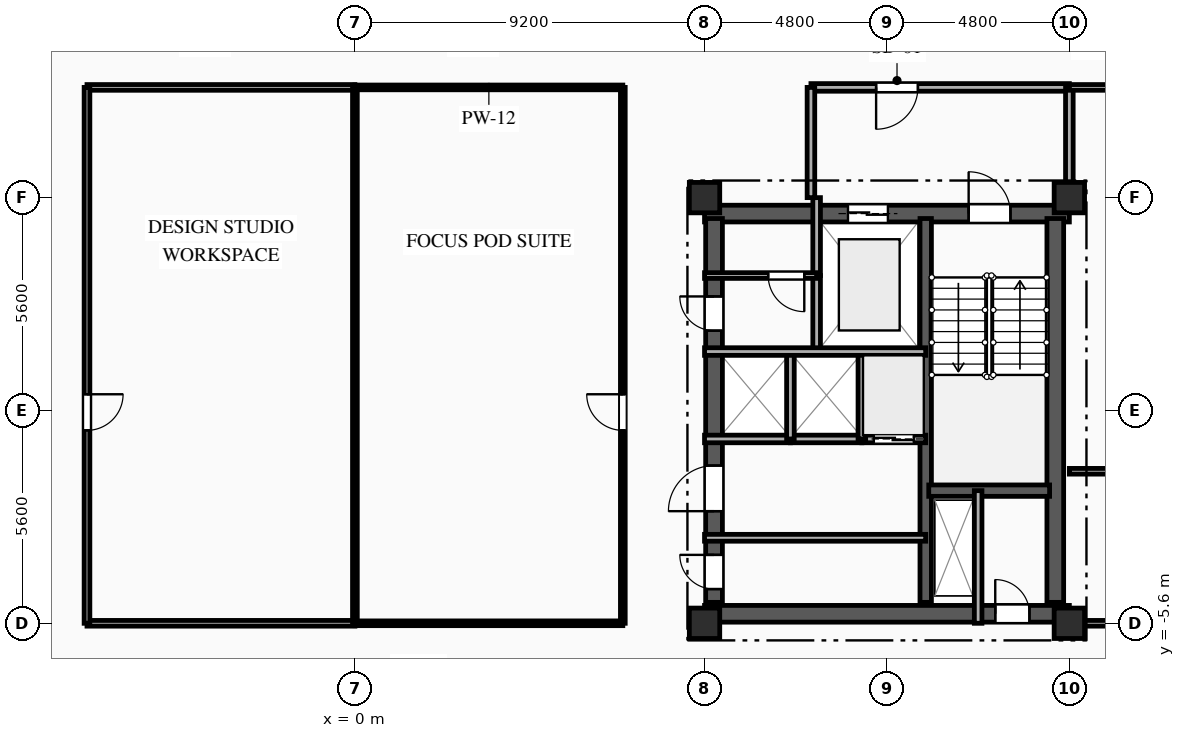
"""IFC4 building model, lengths in metres.
Left out: names, types, materials, properties, quantities, classifications, styles, units other than length and angle.
Written with IfcOpenShell. Run it as: python <this file> out.ifc"""

import sys

from ifc_helpers import new_model, si_unit, direction, frame, frame_2d, origin, origin_2d, place, context, subcontext, project, spatial, rectangle, extrude, element, fill, save


model = new_model("IFC4")
c1 = context("Model", 3, precision=1e-05, world=origin(), true_north=direction((0.0, 1.0)))
c2 = subcontext(c1, "Body", "Model", "MODEL_VIEW")
j1 = project(units=[si_unit("LENGTHUNIT", "METRE"), si_unit("PLANEANGLEUNIT", "RADIAN")], contexts=[c1])
p1 = place(None, origin())
s1 = spatial("IfcSite", under=j1, at=p1, CompositionType="ELEMENT")
p2 = place(p1, origin())
s2 = spatial("IfcBuilding", under=s1, at=p2, CompositionType="ELEMENT")
p3 = place(p2, frame((0.0, 0.0, 235.0)))
s3 = spatial("IfcBuildingStorey", under=s2, at=p3, CompositionType="ELEMENT", Elevation=235.0)
for number, where, z_axis, x_axis in (
    (1, (9.2, -5.6, 0.0), (0.0, 0.0, 1.0), (1.0, 0.0, 0.0)),
    (2, (9.2, 5.6, 0.0), (0.0, 0.0, 1.0), (1.0, 0.0, 0.0)),
    (3, (18.8, -5.6, 0.0), (0.0, 0.0, 1.0), (1.0, 0.0, 0.0)),
    (4, (18.8, 5.6, 0.0), (0.0, 0.0, 1.0), (1.0, 0.0, 0.0)),
):
    element("IfcColumn", number, at=place(p3, frame(where, z_axis=z_axis, x_axis=x_axis)), inside=s3, PredefinedType="COLUMN", context=c2, shape_type="SweptSolid", body=[
        extrude(rectangle(XDim=0.8, YDim=0.8, at=origin_2d()), origin(), (0.0, 0.0, 1.0), 3.35),
    ])
p4 = place(p3, frame((9.2, 5.18, 0.0), z_axis=(0.0, 0.0, 1.0), x_axis=(1.0, 0.0, 0.0)))
e5 = element("IfcWall", 5, at=p4, inside=s3, PredefinedType="SHEAR", context=c2, shape_type="SweptSolid", body=[
    extrude(rectangle(XDim=9.6, YDim=0.44, at=frame_2d((4.8, 0.0))), origin(), (0.0, 0.0, 1.0), 3.04),
])
p5 = place(p4, frame((6.95, 0.0, 0.0)))
e6 = element("IfcOpeningElement", 6, at=p5, cuts=e5, PredefinedType="OPENING", context=c2, shape_type="SweptSolid", body=[
    extrude(rectangle(XDim=1.1, YDim=2.15, at=frame_2d((0.55, 1.075))), frame((0.0, 0.23, 0.0), z_axis=(0.0, -1.0, 0.0), x_axis=(1.0, 0.0, 0.0)), (0.0, 0.0, 1.0), 0.46),
])
p6 = place(p4, frame((3.775, 0.0, 0.0)))
e7 = element("IfcOpeningElement", 7, at=p6, cuts=e5, PredefinedType="OPENING", context=c2, shape_type="SweptSolid", body=[
    extrude(rectangle(XDim=1.05, YDim=2.1, at=frame_2d((0.525, 1.05))), frame((0.0, 0.23, 0.0), z_axis=(0.0, -1.0, 0.0), x_axis=(1.0, 0.0, 0.0)), (0.0, 0.0, 1.0), 0.46),
])
p7 = place(p3, frame((9.2, -5.35, 0.0), z_axis=(0.0, 0.0, 1.0), x_axis=(1.0, 0.0, 0.0)))
e8 = element("IfcWall", 8, at=p7, inside=s3, PredefinedType="SHEAR", context=c2, shape_type="SweptSolid", body=[
    extrude(rectangle(XDim=9.6, YDim=0.44, at=frame_2d((4.8, 0.0))), origin(), (0.0, 0.0, 1.0), 3.04),
])
p8 = place(p7, frame((7.65, 0.0, 0.0)))
e9 = element("IfcOpeningElement", 9, at=p8, cuts=e8, PredefinedType="OPENING", context=c2, shape_type="SweptSolid", body=[
    extrude(rectangle(XDim=0.9, YDim=2.1, at=frame_2d((0.45, 1.05))), frame((0.0, 0.23, 0.0), z_axis=(0.0, -1.0, 0.0), x_axis=(1.0, 0.0, 0.0)), (0.0, 0.0, 1.0), 0.46),
])
p9 = place(p3, frame((9.45, -5.05, 0.0), z_axis=(0.0, 0.0, 1.0), x_axis=(0.0, 1.0, 0.0)))
e10 = element("IfcWall", 10, at=p9, inside=s3, PredefinedType="SHEAR", context=c2, shape_type="SweptSolid", body=[
    extrude(rectangle(XDim=10.1, YDim=0.44, at=frame_2d((5.05, 0.0))), origin(), (0.0, 0.0, 1.0), 3.04),
])
p10 = place(p9, frame((7.15, 0.0, 0.0)))
e11 = element("IfcOpeningElement", 11, at=p10, cuts=e10, PredefinedType="OPENING", context=c2, shape_type="SweptSolid", body=[
    extrude(rectangle(XDim=0.9, YDim=2.1, at=frame_2d((0.45, 1.05))), frame((0.0, 0.23, 0.0), z_axis=(0.0, -1.0, 0.0), x_axis=(1.0, 0.0, 0.0)), (0.0, 0.0, 1.0), 0.46),
])
p11 = place(p9, frame((2.4, 0.0, 0.0)))
e12 = element("IfcOpeningElement", 12, at=p11, cuts=e10, PredefinedType="OPENING", context=c2, shape_type="SweptSolid", body=[
    extrude(rectangle(XDim=1.2, YDim=2.15, at=frame_2d((0.6, 1.075))), frame((0.0, 0.23, 0.0), z_axis=(0.0, -1.0, 0.0), x_axis=(1.0, 0.0, 0.0)), (0.0, 0.0, 1.0), 0.46),
])
p12 = place(p9, frame((0.35, 0.0, 0.0)))
e13 = element("IfcOpeningElement", 13, at=p12, cuts=e10, PredefinedType="OPENING", context=c2, shape_type="SweptSolid", body=[
    extrude(rectangle(XDim=0.9, YDim=2.1, at=frame_2d((0.45, 1.05))), frame((0.0, 0.23, 0.0), z_axis=(0.0, -1.0, 0.0), x_axis=(1.0, 0.0, 0.0)), (0.0, 0.0, 1.0), 0.46),
])
p13 = place(p3, frame((18.43, -5.05, 0.0), z_axis=(0.0, 0.0, 1.0), x_axis=(0.0, 1.0, 0.0)))
e14 = element("IfcWall", 14, at=p13, inside=s3, PredefinedType="SHEAR", context=c2, shape_type="SweptSolid", body=[
    extrude(rectangle(XDim=10.1, YDim=0.44, at=frame_2d((5.05, 0.0))), origin(), (0.0, 0.0, 1.0), 3.04),
])
p14 = place(p3, frame((15.02, -5.05, 0.0), z_axis=(0.0, 0.0, 1.0), x_axis=(0.0, 1.0, 0.0)))
e15 = element("IfcWall", 15, at=p14, inside=s3, PredefinedType="SHEAR", context=c2, shape_type="SweptSolid", body=[
    extrude(rectangle(XDim=10.1, YDim=0.3, at=frame_2d((5.05, 0.0))), origin(), (0.0, 0.0, 1.0), 3.04),
])
p15 = place(p3, frame((15.1, -2.11, 0.0), z_axis=(0.0, 0.0, 1.0), x_axis=(1.0, 0.0, 0.0)))
e16 = element("IfcWall", 16, at=p15, inside=s3, PredefinedType="SHEAR", context=c2, shape_type="SweptSolid", body=[
    extrude(rectangle(XDim=3.18, YDim=0.3, at=frame_2d((1.59, 0.0))), origin(), (0.0, 0.0, 1.0), 3.04),
])
p16 = place(p3, frame((16.4, -2.11, 0.0), z_axis=(0.0, 0.0, 1.0), x_axis=(0.0, -1.0, 0.0)))
e17 = element("IfcWall", 17, at=p16, inside=s3, PredefinedType="PARTITIONING", context=c2, shape_type="SweptSolid", body=[
    extrude(rectangle(XDim=3.49, YDim=0.2, at=frame_2d((1.745, 0.0))), origin(), (0.0, 0.0, 1.0), 3.04),
])
p17 = place(p3, frame((12.15, 3.55, 0.0), z_axis=(0.0, 0.0, 1.0), x_axis=(0.0, -1.0, 0.0)))
e18 = element("IfcWall", 18, at=p17, inside=s3, PredefinedType="PARTITIONING", context=c2, shape_type="SweptSolid", body=[
    extrude(rectangle(XDim=2.0, YDim=0.2, at=frame_2d((1.0, 0.0))), origin(), (0.0, 0.0, 1.0), 3.04),
])
p18 = place(p3, frame((12.15, 5.6, 0.0), z_axis=(0.0, 0.0, 1.0), x_axis=(0.0, -1.0, 0.0)))
e19 = element("IfcWall", 19, at=p18, inside=s3, PredefinedType="PARTITIONING", context=c2, shape_type="SweptSolid", body=[
    extrude(rectangle(XDim=2.05, YDim=0.2, at=frame_2d((1.025, 0.0))), origin(), (0.0, 0.0, 1.0), 3.04),
])
p19 = place(p3, frame((18.8, 8.5, 0.0), z_axis=(0.0, 0.0, 1.0), x_axis=(-1.0, 0.0, 0.0)))
e20 = element("IfcWall", 20, at=p19, inside=s3, PredefinedType="PARTITIONING", context=c2, shape_type="SweptSolid", body=[
    extrude(rectangle(XDim=6.8, YDim=0.2, at=frame_2d((3.4, 0.0))), origin(), (0.0, 0.0, 1.0), 3.04),
])
p20 = place(p19, frame((3.985, 0.0, 0.0)))
e21 = element("IfcOpeningElement", 21, at=p20, cuts=e20, PredefinedType="OPENING", context=c2, shape_type="SweptSolid", body=[
    extrude(rectangle(XDim=1.1, YDim=2.15, at=frame_2d((0.55, 1.075))), frame((0.0, 0.11, 0.0), z_axis=(0.0, -1.0, 0.0), x_axis=(1.0, 0.0, 0.0)), (0.0, 0.0, 1.0), 0.22),
])
p21 = place(p3, frame((12.0, 8.5, 0.0), z_axis=(0.0, 0.0, 1.0), x_axis=(0.0, -1.0, 0.0)))
e22 = element("IfcWall", 22, at=p21, inside=s3, PredefinedType="PARTITIONING", context=c2, shape_type="SweptSolid", body=[
    extrude(rectangle(XDim=2.9, YDim=0.2, at=frame_2d((1.45, 0.0))), origin(), (0.0, 0.0, 1.0), 3.04),
])
p22 = place(p3, frame((18.8, 5.6, 0.0), z_axis=(0.0, 0.0, 1.0), x_axis=(0.0, 1.0, 0.0)))
e23 = element("IfcWall", 23, at=p22, inside=s3, PredefinedType="PARTITIONING", context=c2, shape_type="SweptSolid", body=[
    extrude(rectangle(XDim=2.9, YDim=0.2, at=frame_2d((1.45, 0.0))), origin(), (0.0, 0.0, 1.0), 2.665),
])
p23 = place(p3, frame((12.15, 3.55, 0.0), z_axis=(0.0, 0.0, 1.0), x_axis=(-1.0, 0.0, 0.0)))
e24 = element("IfcWall", 24, at=p23, inside=s3, PredefinedType="PARTITIONING", context=c2, shape_type="SweptSolid", body=[
    extrude(rectangle(XDim=2.95, YDim=0.15, at=frame_2d((1.475, 0.0))), origin(), (0.0, 0.0, 1.0), 3.04),
])
p24 = place(p23, frame((0.325, 0.0, 0.0)))
e25 = element("IfcOpeningElement", 25, at=p24, cuts=e24, PredefinedType="OPENING", context=c2, shape_type="SweptSolid", body=[
    extrude(rectangle(XDim=0.95, YDim=2.1, at=frame_2d((0.475, 1.05))), frame((0.0, 0.085, 0.0), z_axis=(0.0, -1.0, 0.0), x_axis=(1.0, 0.0, 0.0)), (0.0, 0.0, 1.0), 0.17),
])
p25 = place(p3, frame((9.2, -3.35, 0.0), z_axis=(0.0, 0.0, 1.0), x_axis=(1.0, 0.0, 0.0)))
e26 = element("IfcWall", 26, at=p25, inside=s3, PredefinedType="PARTITIONING", context=c2, shape_type="SweptSolid", body=[
    extrude(rectangle(XDim=5.82, YDim=0.18, at=frame_2d((2.91, 0.0))), origin(), (0.0, 0.0, 1.0), 2.755),
])
p26 = place(p3, frame((11.46, -0.75, 0.0), z_axis=(0.0, 0.0, 1.0), x_axis=(-1.0, 0.0, 0.0)))
e27 = element("IfcWall", 27, at=p26, inside=s3, PredefinedType="PARTITIONING", context=c2, shape_type="SweptSolid", body=[
    extrude(rectangle(XDim=2.26, YDim=0.2, at=frame_2d((1.13, 0.0))), origin(), (0.0, 0.0, 1.0), 3.04),
])
p27 = place(p3, frame((13.34, -0.75, 0.0), z_axis=(0.0, 0.0, 1.0), x_axis=(-1.0, 0.0, 0.0)))
e28 = element("IfcWall", 28, at=p27, inside=s3, PredefinedType="PARTITIONING", context=c2, shape_type="SweptSolid", body=[
    extrude(rectangle(XDim=1.88, YDim=0.2, at=frame_2d((0.94, 0.0))), origin(), (0.0, 0.0, 1.0), 3.04),
])
p28 = place(p3, frame((15.02, -0.75, 0.0), z_axis=(0.0, 0.0, 1.0), x_axis=(-1.0, 0.0, 0.0)))
e29 = element("IfcWall", 29, at=p28, inside=s3, PredefinedType="PARTITIONING", context=c2, shape_type="SweptSolid", body=[
    extrude(rectangle(XDim=1.68, YDim=0.2, at=frame_2d((0.84, 0.0))), origin(), (0.0, 0.0, 1.0), 3.04),
])
p29 = place(p28, frame((0.315, 0.0, 0.0)))
e30 = element("IfcOpeningElement", 30, at=p29, cuts=e29, PredefinedType="OPENING", context=c2, shape_type="SweptSolid", body=[
    extrude(rectangle(XDim=1.05, YDim=2.1, at=frame_2d((0.525, 1.05))), frame((0.0, 0.11, 0.0), z_axis=(0.0, -1.0, 0.0), x_axis=(1.0, 0.0, 0.0)), (0.0, 0.0, 1.0), 0.22),
])
for number, where, z_axis, x_axis in (
    (31, (11.46, -0.75, 0.0), (0.0, 0.0, 1.0), (0.0, 1.0, 0.0)),
    (32, (13.34, -0.75, 0.0), (0.0, 0.0, 1.0), (0.0, 1.0, 0.0)),
):
    element("IfcWall", number, at=place(p3, frame(where, z_axis=z_axis, x_axis=x_axis)), inside=s3, PredefinedType="PARTITIONING", context=c2, shape_type="SweptSolid", body=[
        extrude(rectangle(XDim=2.3, YDim=0.2, at=frame_2d((1.15, 0.0))), origin(), (0.0, 0.0, 1.0), 3.04),
    ])
p30 = place(p3, frame((0.0, 8.5, 0.0), z_axis=(0.0, 0.0, 1.0), x_axis=(-1.0, 0.0, 0.0)))
e33 = element("IfcWall", 33, at=p30, inside=s3, PredefinedType="PARTITIONING", context=c2, shape_type="SweptSolid", body=[
    extrude(rectangle(XDim=7.05, YDim=0.15, at=frame_2d((3.525, 0.0))), origin(), (0.0, 0.0, 1.0), 3.04),
])
p31 = place(p3, frame((20.5, 8.5, 0.0), z_axis=(0.0, 0.0, 1.0), x_axis=(-1.0, 0.0, 0.0)))
e34 = element("IfcWall", 34, at=p31, inside=s3, PredefinedType="PARTITIONING", context=c2, shape_type="SweptSolid", body=[
    extrude(rectangle(XDim=1.7, YDim=0.15, at=frame_2d((0.85, 0.0))), origin(), (0.0, 0.0, 1.0), 3.04),
])
p32 = place(p3, frame((7.05, 8.5, 0.0), z_axis=(0.0, 0.0, 1.0), x_axis=(-1.0, 0.0, 0.0)))
e35 = element("IfcWall", 35, at=p32, inside=s3, PredefinedType="PARTITIONING", context=c2, shape_type="SweptSolid", body=[
    extrude(rectangle(XDim=7.05, YDim=0.125, at=frame_2d((3.525, 0.0))), origin(), (0.0, 0.0, 1.0), 3.04),
])
p33 = place(p3, frame((-7.05, -5.6, 0.0), z_axis=(0.0, 0.0, 1.0), x_axis=(1.0, 0.0, 0.0)))
e36 = element("IfcWall", 36, at=p33, inside=s3, PredefinedType="PARTITIONING", context=c2, shape_type="SweptSolid", body=[
    extrude(rectangle(XDim=7.05, YDim=0.15, at=frame_2d((3.525, 0.0))), origin(), (0.0, 0.0, 1.0), 2.525),
])
p34 = place(p3, frame((18.8, -5.6, 0.0), z_axis=(0.0, 0.0, 1.0), x_axis=(1.0, 0.0, 0.0)))
e37 = element("IfcWall", 37, at=p34, inside=s3, PredefinedType="PARTITIONING", context=c2, shape_type="SweptSolid", body=[
    extrude(rectangle(XDim=1.7, YDim=0.15, at=frame_2d((0.85, 0.0))), origin(), (0.0, 0.0, 1.0), 3.04),
])
p35 = place(p3, frame((0.0, -5.6, 0.0), z_axis=(0.0, 0.0, 1.0), x_axis=(1.0, 0.0, 0.0)))
e38 = element("IfcWall", 38, at=p35, inside=s3, PredefinedType="PARTITIONING", context=c2, shape_type="SweptSolid", body=[
    extrude(rectangle(XDim=7.05, YDim=0.125, at=frame_2d((3.525, 0.0))), origin(), (0.0, 0.0, 1.0), 2.525),
])
p36 = place(p3, frame((-7.05, 8.5, 0.0), z_axis=(0.0, 0.0, 1.0), x_axis=(0.0, -1.0, 0.0)))
e39 = element("IfcWall", 39, at=p36, inside=s3, PredefinedType="PARTITIONING", context=c2, shape_type="SweptSolid", body=[
    extrude(rectangle(XDim=14.1, YDim=0.15, at=frame_2d((7.05, 0.0))), origin(), (0.0, 0.0, 1.0), 3.04),
])
p37 = place(p36, frame((8.074, 0.0, 0.0)))
e40 = element("IfcOpeningElement", 40, at=p37, cuts=e39, PredefinedType="OPENING", context=c2, shape_type="SweptSolid", body=[
    extrude(rectangle(XDim=0.95, YDim=2.1, at=frame_2d((0.475, 1.05))), frame((0.0, 0.085, 0.0), z_axis=(0.0, -1.0, 0.0), x_axis=(1.0, 0.0, 0.0)), (0.0, 0.0, 1.0), 0.17),
])
p38 = place(p3, frame((7.05, -5.6, 0.0), z_axis=(0.0, 0.0, 1.0), x_axis=(0.0, 1.0, 0.0)))
e41 = element("IfcWall", 41, at=p38, inside=s3, PredefinedType="PARTITIONING", context=c2, shape_type="SweptSolid", body=[
    extrude(rectangle(XDim=14.1, YDim=0.125, at=frame_2d((7.05, 0.0))), origin(), (0.0, 0.0, 1.0), 3.04),
])
p39 = place(p38, frame((5.076, 0.0, 0.0)))
e42 = element("IfcOpeningElement", 42, at=p39, cuts=e41, PredefinedType="OPENING", context=c2, shape_type="SweptSolid", body=[
    extrude(rectangle(XDim=0.95, YDim=2.1, at=frame_2d((0.475, 1.05))), frame((0.0, 0.073, 0.0), z_axis=(0.0, -1.0, 0.0), x_axis=(1.0, 0.0, 0.0)), (0.0, 0.0, 1.0), 0.145),
])
p40 = place(p3, frame((18.8, -1.6, 0.0), z_axis=(0.0, 0.0, 1.0), x_axis=(1.0, 0.0, 0.0)))
e43 = element("IfcWall", 43, at=p40, inside=s3, PredefinedType="PARTITIONING", context=c2, shape_type="SweptSolid", body=[
    extrude(rectangle(XDim=4.8, YDim=0.15, at=frame_2d((2.4, 0.0))), origin(), (0.0, 0.0, 1.0), 3.04),
])
p41 = place(p3, frame((0.0, 8.5, 0.0), z_axis=(0.0, 0.0, 1.0), x_axis=(0.0, -1.0, 0.0)))
e44 = element("IfcWall", 44, at=p41, inside=s3, PredefinedType="PARTITIONING", context=c2, shape_type="SweptSolid", body=[
    extrude(rectangle(XDim=14.1, YDim=0.125, at=frame_2d((7.05, 0.0))), origin(), (0.0, 0.0, 1.0), 3.04),
])
p42 = place(p3, frame((9.2, 1.55, 0.0), z_axis=(0.0, 0.0, 1.0), x_axis=(1.0, 0.0, 0.0)))
e45 = element("IfcWall", 45, at=p42, inside=s3, PredefinedType="PARTITIONING", context=c2, shape_type="SweptSolid", body=[
    extrude(rectangle(XDim=5.82, YDim=0.2, at=frame_2d((2.91, 0.0))), origin(), (0.0, 0.0, 1.0), 3.04),
])
p43 = place(p5, origin())
e46 = element("IfcDoor", 46, at=p43, inside=s3, OperationType="SINGLE_SWING_LEFT", PredefinedType="DOOR", context=c2, shape_type="SweptSolid", body=[
    extrude(rectangle(XDim=1.1, YDim=2.15, at=frame_2d((0.55, 1.075))), frame((0.0, 0.025, 0.0), z_axis=(0.0, -1.0, 0.0), x_axis=(1.0, 0.0, 0.0)), (0.0, 0.0, 1.0), 0.05),
])
fill(e6, e46)
p44 = place(p6, origin())
e47 = element("IfcDoor", 47, at=p44, inside=s3, OperationType="DOUBLE_DOOR_SLIDING", PredefinedType="DOOR", context=c2, shape_type="SweptSolid", body=[
    extrude(rectangle(XDim=1.05, YDim=2.1, at=frame_2d((0.525, 1.05))), frame((0.0, 0.025, 0.0), z_axis=(0.0, -1.0, 0.0), x_axis=(1.0, 0.0, 0.0)), (0.0, 0.0, 1.0), 0.05),
])
fill(e7, e47)
p45 = place(p8, origin())
e48 = element("IfcDoor", 48, at=p45, inside=s3, OperationType="SINGLE_SWING_LEFT", PredefinedType="DOOR", context=c2, shape_type="SweptSolid", body=[
    extrude(rectangle(XDim=0.9, YDim=2.1, at=frame_2d((0.45, 1.05))), frame((0.0, 0.025, 0.0), z_axis=(0.0, -1.0, 0.0), x_axis=(1.0, 0.0, 0.0)), (0.0, 0.0, 1.0), 0.05),
])
fill(e9, e48)
p46 = place(p20, origin())
e49 = element("IfcDoor", 49, at=p46, inside=s3, OperationType="SINGLE_SWING_RIGHT", PredefinedType="DOOR", context=c2, shape_type="SweptSolid", body=[
    extrude(rectangle(XDim=1.1, YDim=2.15, at=frame_2d((0.55, 1.075))), frame((0.0, 0.025, 0.0), z_axis=(0.0, -1.0, 0.0), x_axis=(1.0, 0.0, 0.0)), (0.0, 0.0, 1.0), 0.05),
])
fill(e21, e49)
p47 = place(p24, origin())
e50 = element("IfcDoor", 50, at=p47, inside=s3, OperationType="SINGLE_SWING_LEFT", PredefinedType="DOOR", context=c2, shape_type="SweptSolid", body=[
    extrude(rectangle(XDim=0.95, YDim=2.1, at=frame_2d((0.475, 1.05))), frame((0.0, 0.025, 0.0), z_axis=(0.0, -1.0, 0.0), x_axis=(1.0, 0.0, 0.0)), (0.0, 0.0, 1.0), 0.05),
])
fill(e25, e50)
p48 = place(p10, origin())
e51 = element("IfcDoor", 51, at=p48, inside=s3, OperationType="SINGLE_SWING_RIGHT", PredefinedType="DOOR", context=c2, shape_type="SweptSolid", body=[
    extrude(rectangle(XDim=0.9, YDim=2.1, at=frame_2d((0.45, 1.05))), frame((0.0, 0.025, 0.0), z_axis=(0.0, -1.0, 0.0), x_axis=(1.0, 0.0, 0.0)), (0.0, 0.0, 1.0), 0.05),
])
fill(e11, e51)
p49 = place(p29, origin())
e52 = element("IfcDoor", 52, at=p49, inside=s3, OperationType="DOUBLE_DOOR_SLIDING", PredefinedType="DOOR", context=c2, shape_type="SweptSolid", body=[
    extrude(rectangle(XDim=1.05, YDim=2.1, at=frame_2d((0.525, 1.05))), frame((0.0, 0.025, 0.0), z_axis=(0.0, -1.0, 0.0), x_axis=(1.0, 0.0, 0.0)), (0.0, 0.0, 1.0), 0.05),
])
fill(e30, e52)
p50 = place(p11, origin())
e53 = element("IfcDoor", 53, at=p50, inside=s3, OperationType="SINGLE_SWING_LEFT", PredefinedType="DOOR", context=c2, shape_type="SweptSolid", body=[
    extrude(rectangle(XDim=1.2, YDim=2.15, at=frame_2d((0.6, 1.075))), frame((0.0, 0.025, 0.0), z_axis=(0.0, -1.0, 0.0), x_axis=(1.0, 0.0, 0.0)), (0.0, 0.0, 1.0), 0.05),
])
fill(e12, e53)
p51 = place(p12, origin())
e54 = element("IfcDoor", 54, at=p51, inside=s3, OperationType="SINGLE_SWING_RIGHT", PredefinedType="DOOR", context=c2, shape_type="SweptSolid", body=[
    extrude(rectangle(XDim=0.9, YDim=2.1, at=frame_2d((0.45, 1.05))), frame((0.0, 0.025, 0.0), z_axis=(0.0, -1.0, 0.0), x_axis=(1.0, 0.0, 0.0)), (0.0, 0.0, 1.0), 0.05),
])
fill(e13, e54)
p52 = place(p37, origin())
e55 = element("IfcDoor", 55, at=p52, inside=s3, OperationType="SINGLE_SWING_LEFT", PredefinedType="DOOR", context=c2, shape_type="SweptSolid", body=[
    extrude(rectangle(XDim=0.95, YDim=2.1, at=frame_2d((0.475, 1.05))), frame((0.0, 0.025, 0.0), z_axis=(0.0, -1.0, 0.0), x_axis=(1.0, 0.0, 0.0)), (0.0, 0.0, 1.0), 0.05),
])
fill(e40, e55)
p53 = place(p39, origin())
e56 = element("IfcDoor", 56, at=p53, inside=s3, OperationType="SINGLE_SWING_RIGHT", PredefinedType="DOOR", context=c2, shape_type="SweptSolid", body=[
    extrude(rectangle(XDim=0.95, YDim=2.1, at=frame_2d((0.475, 1.05))), frame((0.0, 0.025, 0.0), z_axis=(0.0, -1.0, 0.0), x_axis=(1.0, 0.0, 0.0)), (0.0, 0.0, 1.0), 0.05),
])
fill(e42, e56)
save(model, sys.argv[1])
